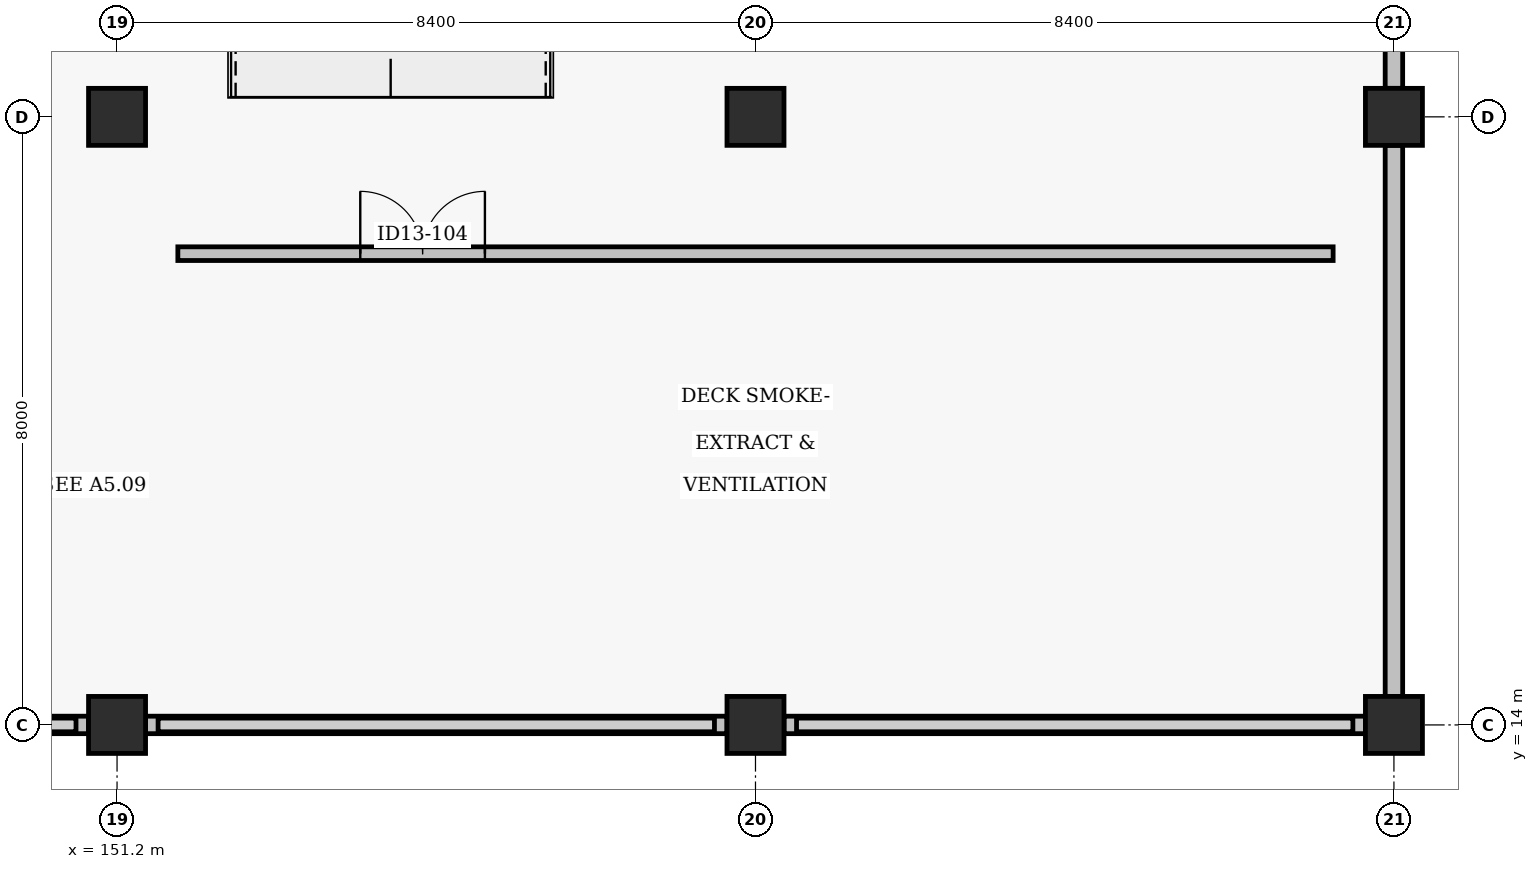
"""IFC4 building model, lengths in metres.
Left out: names, types, materials, properties, quantities, classifications, styles, units other than length and angle.
Written with IfcOpenShell. Run it as: python <this file> out.ifc"""

import sys

from ifc_helpers import new_model, si_unit, direction, frame, frame_2d, origin, origin_2d, place, context, subcontext, project, spatial, rectangle, extrude, element, fill, save


model = new_model("IFC4")
c1 = context("Model", 3, precision=1e-05, world=origin(), true_north=direction((0.0, 1.0)))
c2 = subcontext(c1, "Body", "Model", "MODEL_VIEW")
j1 = project(units=[si_unit("LENGTHUNIT", "METRE"), si_unit("PLANEANGLEUNIT", "RADIAN")], contexts=[c1])
p1 = place(None, origin())
s1 = spatial("IfcSite", under=j1, at=p1, CompositionType="ELEMENT")
p2 = place(p1, origin())
s2 = spatial("IfcBuilding", under=s1, at=p2, CompositionType="ELEMENT")
p3 = place(p2, frame((0.0, 0.0, 9.6)))
s3 = spatial("IfcBuildingStorey", under=s2, at=p3, CompositionType="ELEMENT", Elevation=9.6)
for number, where, z_axis, x_axis in (
    (1, (151.2, 14.0, 0.0), (0.0, 0.0, 1.0), (1.0, 0.0, 0.0)),
    (2, (151.2, 22.0, 0.0), (0.0, 0.0, 1.0), (1.0, 0.0, 0.0)),
    (3, (159.6, 14.0, 0.0), (0.0, 0.0, 1.0), (1.0, 0.0, 0.0)),
    (4, (159.6, 22.0, 0.0), (0.0, 0.0, 1.0), (1.0, 0.0, 0.0)),
    (5, (168.0, 14.0, 0.0), (0.0, 0.0, 1.0), (1.0, 0.0, 0.0)),
    (6, (168.0, 22.0, 0.0), (0.0, 0.0, 1.0), (1.0, 0.0, 0.0)),
):
    element("IfcColumn", number, at=place(p3, frame(where, z_axis=z_axis, x_axis=x_axis)), inside=s3, PredefinedType="COLUMN", context=c2, shape_type="SweptSolid", body=[
        extrude(rectangle(XDim=0.75, YDim=0.75, at=origin_2d()), origin(), (0.0, 0.0, 1.0), 3.52),
    ])
p4 = place(p3, frame((143.175, 14.0, 0.0), z_axis=(0.0, 0.0, 1.0), x_axis=(1.0, 0.0, 0.0)))
e7 = element("IfcWall", 7, at=p4, inside=s3, PredefinedType="PARAPET", context=c2, shape_type="SweptSolid", body=[
    extrude(rectangle(XDim=7.65, YDim=0.23, at=frame_2d((3.825, 0.0))), origin(), (0.0, 0.0, 1.0), 1.15),
])
p5 = place(p3, frame((151.575, 14.0, 0.0), z_axis=(0.0, 0.0, 1.0), x_axis=(1.0, 0.0, 0.0)))
e8 = element("IfcWall", 8, at=p5, inside=s3, PredefinedType="PARAPET", context=c2, shape_type="SweptSolid", body=[
    extrude(rectangle(XDim=7.65, YDim=0.23, at=frame_2d((3.825, 0.0))), origin(), (0.0, 0.0, 1.0), 1.15),
])
p6 = place(p3, frame((159.975, 14.0, 0.0), z_axis=(0.0, 0.0, 1.0), x_axis=(1.0, 0.0, 0.0)))
e9 = element("IfcWall", 9, at=p6, inside=s3, PredefinedType="PARAPET", context=c2, shape_type="SweptSolid", body=[
    extrude(rectangle(XDim=7.65, YDim=0.23, at=frame_2d((3.825, 0.0))), origin(), (0.0, 0.0, 1.0), 1.15),
])
p7 = place(p3, frame((168.0, 14.375, 0.0), z_axis=(0.0, 0.0, 1.0), x_axis=(0.0, 1.0, 0.0)))
e10 = element("IfcWall", 10, at=p7, inside=s3, PredefinedType="PARAPET", context=c2, shape_type="SweptSolid", body=[
    extrude(rectangle(XDim=7.25, YDim=0.23, at=frame_2d((3.625, 0.0))), origin(), (0.0, 0.0, 1.0), 1.15),
])
p8 = place(p3, frame((168.0, 22.375, 0.0), z_axis=(0.0, 0.0, 1.0), x_axis=(0.0, 1.0, 0.0)))
e11 = element("IfcWall", 11, at=p8, inside=s3, PredefinedType="PARAPET", context=c2, shape_type="SweptSolid", body=[
    extrude(rectangle(XDim=7.65, YDim=0.23, at=frame_2d((3.825, 0.0))), origin(), (0.0, 0.0, 1.0), 1.15),
])
p9 = place(p3, frame((152.0, 20.2, 0.0), z_axis=(0.0, 0.0, 1.0), x_axis=(1.0, 0.0, 0.0)))
e12 = element("IfcWall", 12, at=p9, inside=s3, PredefinedType="SOLIDWALL", context=c2, shape_type="SweptSolid", body=[
    extrude(rectangle(XDim=15.2, YDim=0.18, at=frame_2d((7.6, 0.0))), origin(), (0.0, 0.0, 1.0), 2.505),
])
p10 = place(p9, frame((2.4, 0.0, 0.0)))
e13 = element("IfcOpeningElement", 13, at=p10, cuts=e12, PredefinedType="OPENING", context=c2, shape_type="SweptSolid", body=[
    extrude(rectangle(XDim=1.64, YDim=2.16, at=frame_2d((0.82, 1.08))), frame((0.0, 0.1, 0.0), z_axis=(0.0, -1.0, 0.0), x_axis=(1.0, 0.0, 0.0)), (0.0, 0.0, 1.0), 0.2),
])
p11 = place(p10, origin())
e14 = element("IfcDoor", 14, at=p11, inside=s3, OperationType="DOUBLE_DOOR_SINGLE_SWING", PredefinedType="DOOR", context=c2, shape_type="SweptSolid", body=[
    extrude(rectangle(XDim=1.64, YDim=2.16, at=frame_2d((0.82, 1.08))), frame((0.0, 0.025, 0.0), z_axis=(0.0, -1.0, 0.0), x_axis=(1.0, 0.0, 0.0)), (0.0, 0.0, 1.0), 0.05),
])
fill(e13, e14)
save(model, sys.argv[1])
